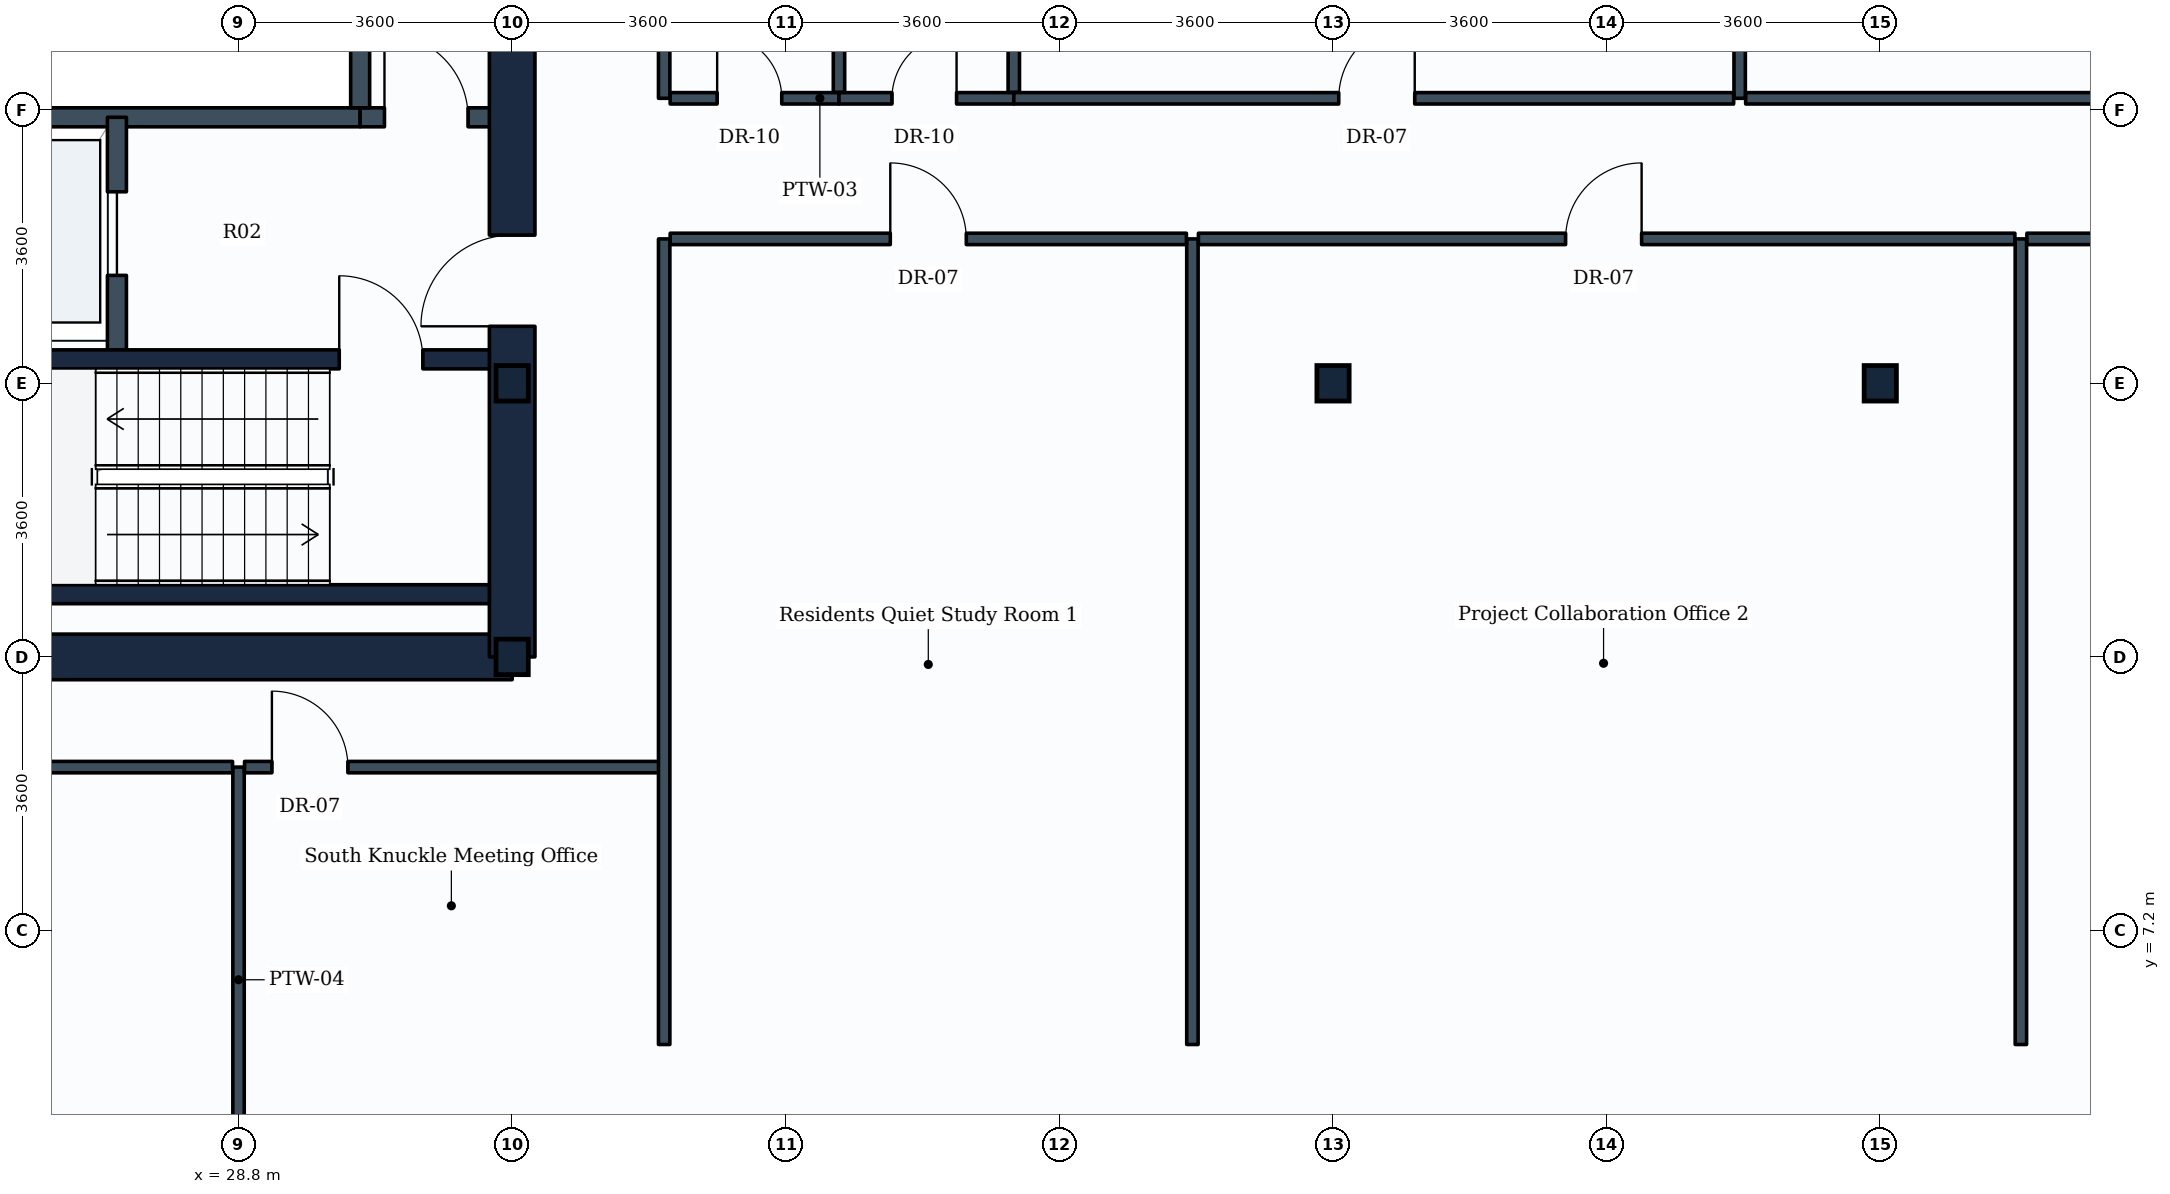
"""IFC4 building model, lengths in metres.
Left out: names, types, materials, properties, quantities, classifications, styles, units other than length and angle.
Written with IfcOpenShell. Run it as: python <this file> out.ifc"""

import sys

from ifc_helpers import new_model, si_unit, direction, frame, frame_2d, origin, origin_2d, place, context, subcontext, project, spatial, rectangle, i_section, extrude, element, fill, save


model = new_model("IFC4")
c1 = context("Model", 3, precision=1e-05, world=origin(), true_north=direction((0.0, 1.0)))
c2 = subcontext(c1, "Body", "Model", "MODEL_VIEW")
j1 = project(units=[si_unit("LENGTHUNIT", "METRE"), si_unit("PLANEANGLEUNIT", "RADIAN")], contexts=[c1])
p1 = place(None, origin())
s1 = spatial("IfcSite", under=j1, at=p1, CompositionType="ELEMENT")
p2 = place(p1, origin())
s2 = spatial("IfcBuilding", under=s1, at=p2, CompositionType="ELEMENT")
p3 = place(p2, frame((0.0, 0.0, 63.0)))
s3 = spatial("IfcBuildingStorey", under=s2, at=p3, CompositionType="ELEMENT", Elevation=63.0)
for number, where, z_axis, x_axis in (
    (1, (32.4, 10.8, 0.0), (0.0, 0.0, 1.0), (1.0, 0.0, 0.0)),
    (2, (32.4, 14.4, 0.0), (0.0, 0.0, 1.0), (1.0, 0.0, 0.0)),
    (3, (43.2, 14.4, 0.0), (0.0, 0.0, 1.0), (1.0, 0.0, 0.0)),
    (4, (50.4, 14.4, 0.0), (0.0, 0.0, 1.0), (1.0, 0.0, 0.0)),
):
    element("IfcColumn", number, at=place(p3, frame(where, z_axis=z_axis, x_axis=x_axis)), inside=s3, PredefinedType="COLUMN", context=c2, shape_type="SweptSolid", body=[
        extrude(i_section(OverallWidth=0.424, OverallDepth=0.467, WebThickness=0.033, FlangeThickness=0.053, FilletRadius=0.015, at=origin_2d()), origin(), (0.0, 0.0, 1.0), 3.9),
    ])
p4 = place(p3, frame((14.4, 10.8, 0.0), z_axis=(0.0, 0.0, 1.0), x_axis=(1.0, 0.0, 0.0)))
e5 = element("IfcWall", 5, at=p4, inside=s3, PredefinedType="SHEAR", context=c2, shape_type="SweptSolid", body=[
    extrude(rectangle(XDim=18.0, YDim=0.6, at=frame_2d((9.0, 0.0))), origin(), (0.0, 0.0, 1.0), 3.65),
])
p5 = place(p3, frame((32.4, 10.8, 0.0), z_axis=(0.0, 0.0, 1.0), x_axis=(0.0, 1.0, 0.0)))
e6 = element("IfcWall", 6, at=p5, inside=s3, PredefinedType="SHEAR", context=c2, shape_type="SweptSolid", body=[
    extrude(rectangle(XDim=14.4, YDim=0.6, at=frame_2d((7.2, 0.0))), origin(), (0.0, 0.0, 1.0), 3.65),
])
p6 = place(p5, frame((4.35, 0.0, 0.0)))
e7 = element("IfcOpeningElement", 7, at=p6, cuts=e6, PredefinedType="OPENING", context=c2, shape_type="SweptSolid", body=[
    extrude(rectangle(XDim=1.2, YDim=2.1, at=frame_2d((0.6, 1.05))), frame((0.0, 0.31, 0.0), z_axis=(0.0, -1.0, 0.0), x_axis=(1.0, 0.0, 0.0)), (0.0, 0.0, 1.0), 0.62),
])
p7 = place(p5, frame((10.0, 0.0, 0.0)))
e8 = element("IfcOpeningElement", 8, at=p7, cuts=e6, PredefinedType="OPENING", context=c2, shape_type="SweptSolid", body=[
    extrude(rectangle(XDim=1.2, YDim=2.1, at=frame_2d((0.6, 1.05))), frame((0.0, 0.31, 0.0), z_axis=(0.0, -1.0, 0.0), x_axis=(1.0, 0.0, 0.0)), (0.0, 0.0, 1.0), 0.62),
])
p8 = place(p3, frame((23.35, 11.625, 0.0), z_axis=(0.0, 0.0, 1.0), x_axis=(1.0, 0.0, 0.0)))
e9 = element("IfcWall", 9, at=p8, inside=s3, PredefinedType="SHEAR", context=c2, shape_type="SweptSolid", body=[
    extrude(rectangle(XDim=8.75, YDim=0.25, at=frame_2d((4.375, 0.0))), origin(), (0.0, 0.0, 1.0), 3.65),
])
p9 = place(p3, frame((23.35, 14.715, 0.0), z_axis=(0.0, 0.0, 1.0), x_axis=(1.0, 0.0, 0.0)))
e10 = element("IfcWall", 10, at=p9, inside=s3, PredefinedType="SHEAR", context=c2, shape_type="SweptSolid", body=[
    extrude(rectangle(XDim=8.75, YDim=0.25, at=frame_2d((4.375, 0.0))), origin(), (0.0, 0.0, 1.0), 3.65),
])
p10 = place(p9, frame((6.775, 0.0, 0.0)))
e11 = element("IfcOpeningElement", 11, at=p10, cuts=e10, PredefinedType="OPENING", context=c2, shape_type="SweptSolid", body=[
    extrude(rectangle(XDim=1.1, YDim=2.1, at=frame_2d((0.55, 1.05))), frame((0.0, 0.135, 0.0), z_axis=(0.0, -1.0, 0.0), x_axis=(1.0, 0.0, 0.0)), (0.0, 0.0, 1.0), 0.27),
])
p11 = place(p3, frame((21.88, 17.9, 0.0), z_axis=(0.0, 0.0, 1.0), x_axis=(1.0, 0.0, 0.0)))
e12 = element("IfcWall", 12, at=p11, inside=s3, PredefinedType="PARTITIONING", context=c2, shape_type="SweptSolid", body=[
    extrude(rectangle(XDim=8.52, YDim=0.25, at=frame_2d((4.26, 0.0))), origin(), (0.0, 0.0, 1.0), 3.635),
])
p12 = place(p3, frame((30.4, 17.9, 0.0), z_axis=(0.0, 0.0, 1.0), x_axis=(1.0, 0.0, 0.0)))
e13 = element("IfcWall", 13, at=p12, inside=s3, PredefinedType="PARTITIONING", context=c2, shape_type="SweptSolid", body=[
    extrude(rectangle(XDim=1.75, YDim=0.25, at=frame_2d((0.875, 0.0))), origin(), (0.0, 0.0, 1.0), 3.635),
])
p13 = place(p12, frame((0.32, 0.0, 0.0)))
e14 = element("IfcOpeningElement", 14, at=p13, cuts=e13, PredefinedType="OPENING", context=c2, shape_type="SweptSolid", body=[
    extrude(rectangle(XDim=1.1, YDim=2.1, at=frame_2d((0.55, 1.05))), frame((0.0, 0.135, 0.0), z_axis=(0.0, -1.0, 0.0), x_axis=(1.0, 0.0, 0.0)), (0.0, 0.0, 1.0), 0.27),
])
p14 = place(p3, frame((27.2, 14.84, 0.0), z_axis=(0.0, 0.0, 1.0), x_axis=(0.0, 1.0, 0.0)))
e15 = element("IfcWall", 15, at=p14, inside=s3, PredefinedType="PARTITIONING", context=c2, shape_type="SweptSolid", body=[
    extrude(rectangle(XDim=3.06, YDim=0.25, at=frame_2d((1.53, 0.0))), origin(), (0.0, 0.0, 1.0), 3.635),
])
p15 = place(p14, frame((0.98, 0.0, 0.0)))
e16 = element("IfcOpeningElement", 16, at=p15, cuts=e15, PredefinedType="OPENING", context=c2, shape_type="SweptSolid", body=[
    extrude(rectangle(XDim=1.1, YDim=2.1, at=frame_2d((0.55, 1.05))), frame((0.0, 0.135, 0.0), z_axis=(0.0, -1.0, 0.0), x_axis=(1.0, 0.0, 0.0)), (0.0, 0.0, 1.0), 0.27),
])
p16 = place(p3, frame((30.4, 18.025, 0.0), z_axis=(0.0, 0.0, 1.0), x_axis=(0.0, 1.0, 0.0)))
e17 = element("IfcWall", 17, at=p16, inside=s3, PredefinedType="PARTITIONING", context=c2, shape_type="SweptSolid", body=[
    extrude(rectangle(XDim=2.27, YDim=0.25, at=frame_2d((1.135, 0.0))), origin(), (0.0, 0.0, 1.0), 3.635),
])
p17 = place(p3, frame((34.4, 18.15, 0.0), z_axis=(0.0, 0.0, 1.0), x_axis=(0.0, 1.0, 0.0)))
e18 = element("IfcWall", 18, at=p17, inside=s3, PredefinedType="PARTITIONING", context=c2, shape_type="SweptSolid", body=[
    extrude(rectangle(XDim=6.896, YDim=0.15, at=frame_2d((3.448, 0.0))), origin(), (0.0, 0.0, 1.0), 2.93),
])
p18 = place(p3, frame((34.479, 18.15, 0.0), z_axis=(0.0, 0.0, 1.0), x_axis=(1.0, 0.0, 0.0)))
e19 = element("IfcWall", 19, at=p18, inside=s3, PredefinedType="PARTITIONING", context=c2, shape_type="SweptSolid", body=[
    extrude(rectangle(XDim=2.221, YDim=0.15, at=frame_2d((1.11, 0.0))), origin(), (0.0, 0.0, 1.0), 3.08),
])
p19 = place(p18, frame((0.618, 0.0, 0.0)))
e20 = element("IfcOpeningElement", 20, at=p19, cuts=e19, PredefinedType="OPENING", context=c2, shape_type="SweptSolid", body=[
    extrude(rectangle(XDim=0.85, YDim=2.1, at=frame_2d((0.425, 1.05))), frame((0.0, 0.085, 0.0), z_axis=(0.0, -1.0, 0.0), x_axis=(1.0, 0.0, 0.0)), (0.0, 0.0, 1.0), 0.17),
])
p20 = place(p3, frame((36.7, 18.229, 0.0), z_axis=(0.0, 0.0, 1.0), x_axis=(0.0, 1.0, 0.0)))
e21 = element("IfcWall", 21, at=p20, inside=s3, PredefinedType="PARTITIONING", context=c2, shape_type="SweptSolid", body=[
    extrude(rectangle(XDim=6.817, YDim=0.15, at=frame_2d((3.408, 0.0))), origin(), (0.0, 0.0, 1.0), 2.93),
])
p21 = place(p3, frame((36.7, 18.15, 0.0), z_axis=(0.0, 0.0, 1.0), x_axis=(1.0, 0.0, 0.0)))
e22 = element("IfcWall", 22, at=p21, inside=s3, PredefinedType="PARTITIONING", context=c2, shape_type="SweptSolid", body=[
    extrude(rectangle(XDim=2.3, YDim=0.15, at=frame_2d((1.15, 0.0))), origin(), (0.0, 0.0, 1.0), 3.08),
])
p22 = place(p21, frame((0.697, 0.0, 0.0)))
e23 = element("IfcOpeningElement", 23, at=p22, cuts=e22, PredefinedType="OPENING", context=c2, shape_type="SweptSolid", body=[
    extrude(rectangle(XDim=0.85, YDim=2.1, at=frame_2d((0.425, 1.05))), frame((0.0, 0.085, 0.0), z_axis=(0.0, -1.0, 0.0), x_axis=(1.0, 0.0, 0.0)), (0.0, 0.0, 1.0), 0.17),
])
p23 = place(p3, frame((39.0, 18.229, 0.0), z_axis=(0.0, 0.0, 1.0), x_axis=(0.0, 1.0, 0.0)))
e24 = element("IfcWall", 24, at=p23, inside=s3, PredefinedType="PARTITIONING", context=c2, shape_type="SweptSolid", body=[
    extrude(rectangle(XDim=3.821, YDim=0.15, at=frame_2d((1.911, 0.0))), origin(), (0.0, 0.0, 1.0), 3.03),
])
p24 = place(p3, frame((28.8, 9.35, 0.0), z_axis=(0.0, 0.0, 1.0), x_axis=(0.0, -1.0, 0.0)))
e25 = element("IfcWall", 25, at=p24, inside=s3, PredefinedType="PARTITIONING", context=c2, shape_type="SweptSolid", body=[
    extrude(rectangle(XDim=5.596, YDim=0.15, at=frame_2d((2.798, 0.0))), origin(), (0.0, 0.0, 1.0), 3.635),
])
p25 = place(p3, frame((13.08, 9.35, 0.0), z_axis=(0.0, 0.0, 1.0), x_axis=(1.0, 0.0, 0.0)))
e26 = element("IfcWall", 26, at=p25, inside=s3, PredefinedType="PARTITIONING", context=c2, shape_type="SweptSolid", body=[
    extrude(rectangle(XDim=15.641, YDim=0.15, at=frame_2d((7.82, 0.0))), origin(), (0.0, 0.0, 1.0), 3.04),
])
p26 = place(p3, frame((28.879, 9.35, 0.0), z_axis=(0.0, 0.0, 1.0), x_axis=(1.0, 0.0, 0.0)))
e27 = element("IfcWall", 27, at=p26, inside=s3, PredefinedType="PARTITIONING", context=c2, shape_type="SweptSolid", body=[
    extrude(rectangle(XDim=5.521, YDim=0.15, at=frame_2d((2.76, 0.0))), origin(), (0.0, 0.0, 1.0), 3.635),
])
p27 = place(p26, frame((0.36, 0.0, 0.0)))
e28 = element("IfcOpeningElement", 28, at=p27, cuts=e27, PredefinedType="OPENING", context=c2, shape_type="SweptSolid", body=[
    extrude(rectangle(XDim=1.0, YDim=2.1, at=frame_2d((0.5, 1.05))), frame((0.0, 0.085, 0.0), z_axis=(0.0, -1.0, 0.0), x_axis=(1.0, 0.0, 0.0)), (0.0, 0.0, 1.0), 0.17),
])
p28 = place(p3, frame((34.4, 5.7, 0.0), z_axis=(0.0, 0.0, 1.0), x_axis=(0.0, 1.0, 0.0)))
e29 = element("IfcWall", 29, at=p28, inside=s3, PredefinedType="PARTITIONING", context=c2, shape_type="SweptSolid", body=[
    extrude(rectangle(XDim=10.6, YDim=0.15, at=frame_2d((5.3, 0.0))), origin(), (0.0, 0.0, 1.0), 3.08),
])
p29 = place(p3, frame((41.35, 5.7, 0.0), z_axis=(0.0, 0.0, 1.0), x_axis=(0.0, 1.0, 0.0)))
e30 = element("IfcWall", 30, at=p29, inside=s3, PredefinedType="PARTITIONING", context=c2, shape_type="SweptSolid", body=[
    extrude(rectangle(XDim=10.6, YDim=0.15, at=frame_2d((5.3, 0.0))), origin(), (0.0, 0.0, 1.0), 3.03),
])
p30 = place(p3, frame((34.479, 16.3, 0.0), z_axis=(0.0, 0.0, 1.0), x_axis=(1.0, 0.0, 0.0)))
e31 = element("IfcWall", 31, at=p30, inside=s3, PredefinedType="PARTITIONING", context=c2, shape_type="SweptSolid", body=[
    extrude(rectangle(XDim=6.792, YDim=0.15, at=frame_2d((3.396, 0.0))), origin(), (0.0, 0.0, 1.0), 3.04),
])
p31 = place(p30, frame((2.896, 0.0, 0.0)))
e32 = element("IfcOpeningElement", 32, at=p31, cuts=e31, PredefinedType="OPENING", context=c2, shape_type="SweptSolid", body=[
    extrude(rectangle(XDim=1.0, YDim=2.1, at=frame_2d((0.5, 1.05))), frame((0.0, 0.085, 0.0), z_axis=(0.0, -1.0, 0.0), x_axis=(1.0, 0.0, 0.0)), (0.0, 0.0, 1.0), 0.17),
])
p32 = place(p3, frame((52.25, 5.7, 0.0), z_axis=(0.0, 0.0, 1.0), x_axis=(0.0, 1.0, 0.0)))
e33 = element("IfcWall", 33, at=p32, inside=s3, PredefinedType="PARTITIONING", context=c2, shape_type="SweptSolid", body=[
    extrude(rectangle(XDim=10.6, YDim=0.15, at=frame_2d((5.3, 0.0))), origin(), (0.0, 0.0, 1.0), 3.03),
])
p33 = place(p3, frame((41.429, 16.3, 0.0), z_axis=(0.0, 0.0, 1.0), x_axis=(1.0, 0.0, 0.0)))
e34 = element("IfcWall", 34, at=p33, inside=s3, PredefinedType="PARTITIONING", context=c2, shape_type="SweptSolid", body=[
    extrude(rectangle(XDim=10.742, YDim=0.15, at=frame_2d((5.371, 0.0))), origin(), (0.0, 0.0, 1.0), 3.04),
])
p34 = place(p33, frame((4.831, 0.0, 0.0)))
e35 = element("IfcOpeningElement", 35, at=p34, cuts=e34, PredefinedType="OPENING", context=c2, shape_type="SweptSolid", body=[
    extrude(rectangle(XDim=1.0, YDim=2.1, at=frame_2d((0.5, 1.05))), frame((0.0, 0.085, 0.0), z_axis=(0.0, -1.0, 0.0), x_axis=(1.0, 0.0, 0.0)), (0.0, 0.0, 1.0), 0.17),
])
p35 = place(p3, frame((52.329, 16.3, 0.0), z_axis=(0.0, 0.0, 1.0), x_axis=(1.0, 0.0, 0.0)))
e36 = element("IfcWall", 36, at=p35, inside=s3, PredefinedType="PARTITIONING", context=c2, shape_type="SweptSolid", body=[
    extrude(rectangle(XDim=8.717, YDim=0.15, at=frame_2d((4.358, 0.0))), origin(), (0.0, 0.0, 1.0), 2.93),
])
p36 = place(p35, frame((3.856, 0.0, 0.0)))
e37 = element("IfcOpeningElement", 37, at=p36, cuts=e36, PredefinedType="OPENING", context=c2, shape_type="SweptSolid", body=[
    extrude(rectangle(XDim=1.0, YDim=2.1, at=frame_2d((0.5, 1.05))), frame((0.0, 0.085, 0.0), z_axis=(0.0, -1.0, 0.0), x_axis=(1.0, 0.0, 0.0)), (0.0, 0.0, 1.0), 0.17),
])
p37 = place(p3, frame((48.55, 18.15, 0.0), z_axis=(0.0, 0.0, 1.0), x_axis=(0.0, 1.0, 0.0)))
e38 = element("IfcWall", 38, at=p37, inside=s3, PredefinedType="PARTITIONING", context=c2, shape_type="SweptSolid", body=[
    extrude(rectangle(XDim=6.896, YDim=0.15, at=frame_2d((3.448, 0.0))), origin(), (0.0, 0.0, 1.0), 2.93),
])
p38 = place(p3, frame((39.0, 18.15, 0.0), z_axis=(0.0, 0.0, 1.0), x_axis=(1.0, 0.0, 0.0)))
e39 = element("IfcWall", 39, at=p38, inside=s3, PredefinedType="PARTITIONING", context=c2, shape_type="SweptSolid", body=[
    extrude(rectangle(XDim=9.471, YDim=0.15, at=frame_2d((4.735, 0.0))), origin(), (0.0, 0.0, 1.0), 3.03),
])
p39 = place(p38, frame((4.275, 0.0, 0.0)))
e40 = element("IfcOpeningElement", 40, at=p39, cuts=e39, PredefinedType="OPENING", context=c2, shape_type="SweptSolid", body=[
    extrude(rectangle(XDim=1.0, YDim=2.1, at=frame_2d((0.5, 1.05))), frame((0.0, 0.085, 0.0), z_axis=(0.0, -1.0, 0.0), x_axis=(1.0, 0.0, 0.0)), (0.0, 0.0, 1.0), 0.17),
])
p40 = place(p3, frame((48.629, 18.15, 0.0), z_axis=(0.0, 0.0, 1.0), x_axis=(1.0, 0.0, 0.0)))
e41 = element("IfcWall", 41, at=p40, inside=s3, PredefinedType="PARTITIONING", context=c2, shape_type="SweptSolid", body=[
    extrude(rectangle(XDim=12.417, YDim=0.15, at=frame_2d((6.208, 0.0))), origin(), (0.0, 0.0, 1.0), 2.93),
])
p41 = place(p40, frame((5.706, 0.0, 0.0)))
e42 = element("IfcOpeningElement", 42, at=p41, cuts=e41, PredefinedType="OPENING", context=c2, shape_type="SweptSolid", body=[
    extrude(rectangle(XDim=1.0, YDim=2.1, at=frame_2d((0.5, 1.05))), frame((0.0, 0.085, 0.0), z_axis=(0.0, -1.0, 0.0), x_axis=(1.0, 0.0, 0.0)), (0.0, 0.0, 1.0), 0.17),
])
p42 = place(p10, origin())
e43 = element("IfcDoor", 43, at=p42, inside=s3, OperationType="SINGLE_SWING_LEFT", PredefinedType="DOOR", context=c2, shape_type="SweptSolid", body=[
    extrude(rectangle(XDim=1.1, YDim=2.1, at=frame_2d((0.55, 1.05))), frame((0.0, 0.025, 0.0), z_axis=(0.0, -1.0, 0.0), x_axis=(1.0, 0.0, 0.0)), (0.0, 0.0, 1.0), 0.05),
])
fill(e11, e43)
p43 = place(p15, origin())
e44 = element("IfcDoor", 44, at=p43, inside=s3, OperationType="SLIDING_TO_LEFT", PredefinedType="DOOR", context=c2, shape_type="SweptSolid", body=[
    extrude(rectangle(XDim=1.1, YDim=2.1, at=frame_2d((0.55, 1.05))), frame((0.0, 0.025, 0.0), z_axis=(0.0, -1.0, 0.0), x_axis=(1.0, 0.0, 0.0)), (0.0, 0.0, 1.0), 0.05),
])
fill(e16, e44)
p44 = place(p6, origin())
e45 = element("IfcDoor", 45, at=p44, inside=s3, OperationType="SINGLE_SWING_LEFT", PredefinedType="DOOR", context=c2, shape_type="SweptSolid", body=[
    extrude(rectangle(XDim=1.2, YDim=2.1, at=frame_2d((0.6, 1.05))), frame((0.0, 0.025, 0.0), z_axis=(0.0, -1.0, 0.0), x_axis=(1.0, 0.0, 0.0)), (0.0, 0.0, 1.0), 0.05),
])
fill(e7, e45)
p45 = place(p13, origin())
e46 = element("IfcDoor", 46, at=p45, inside=s3, OperationType="SINGLE_SWING_LEFT", PredefinedType="DOOR", context=c2, shape_type="SweptSolid", body=[
    extrude(rectangle(XDim=1.1, YDim=2.1, at=frame_2d((0.55, 1.05))), frame((0.0, 0.025, 0.0), z_axis=(0.0, -1.0, 0.0), x_axis=(1.0, 0.0, 0.0)), (0.0, 0.0, 1.0), 0.05),
])
fill(e14, e46)
p46 = place(p19, origin())
e47 = element("IfcDoor", 47, at=p46, inside=s3, OperationType="SINGLE_SWING_LEFT", PredefinedType="DOOR", context=c2, shape_type="SweptSolid", body=[
    extrude(rectangle(XDim=0.85, YDim=2.1, at=frame_2d((0.425, 1.05))), frame((0.0, 0.025, 0.0), z_axis=(0.0, -1.0, 0.0), x_axis=(1.0, 0.0, 0.0)), (0.0, 0.0, 1.0), 0.05),
])
fill(e20, e47)
p47 = place(p22, origin())
e48 = element("IfcDoor", 48, at=p47, inside=s3, OperationType="SINGLE_SWING_RIGHT", PredefinedType="DOOR", context=c2, shape_type="SweptSolid", body=[
    extrude(rectangle(XDim=0.85, YDim=2.1, at=frame_2d((0.425, 1.05))), frame((0.0, 0.025, 0.0), z_axis=(0.0, -1.0, 0.0), x_axis=(1.0, 0.0, 0.0)), (0.0, 0.0, 1.0), 0.05),
])
fill(e23, e48)
p48 = place(p27, origin())
e49 = element("IfcDoor", 49, at=p48, inside=s3, OperationType="SINGLE_SWING_LEFT", PredefinedType="DOOR", context=c2, shape_type="SweptSolid", body=[
    extrude(rectangle(XDim=1.0, YDim=2.1, at=frame_2d((0.5, 1.05))), frame((0.0, 0.025, 0.0), z_axis=(0.0, -1.0, 0.0), x_axis=(1.0, 0.0, 0.0)), (0.0, 0.0, 1.0), 0.05),
])
fill(e28, e49)
p49 = place(p31, origin())
e50 = element("IfcDoor", 50, at=p49, inside=s3, OperationType="SINGLE_SWING_LEFT", PredefinedType="DOOR", context=c2, shape_type="SweptSolid", body=[
    extrude(rectangle(XDim=1.0, YDim=2.1, at=frame_2d((0.5, 1.05))), frame((0.0, 0.025, 0.0), z_axis=(0.0, -1.0, 0.0), x_axis=(1.0, 0.0, 0.0)), (0.0, 0.0, 1.0), 0.05),
])
fill(e32, e50)
p50 = place(p34, origin())
e51 = element("IfcDoor", 51, at=p50, inside=s3, OperationType="SINGLE_SWING_RIGHT", PredefinedType="DOOR", context=c2, shape_type="SweptSolid", body=[
    extrude(rectangle(XDim=1.0, YDim=2.1, at=frame_2d((0.5, 1.05))), frame((0.0, 0.025, 0.0), z_axis=(0.0, -1.0, 0.0), x_axis=(1.0, 0.0, 0.0)), (0.0, 0.0, 1.0), 0.05),
])
fill(e35, e51)
p51 = place(p39, origin())
e52 = element("IfcDoor", 52, at=p51, inside=s3, OperationType="SINGLE_SWING_RIGHT", PredefinedType="DOOR", context=c2, shape_type="SweptSolid", body=[
    extrude(rectangle(XDim=1.0, YDim=2.1, at=frame_2d((0.5, 1.05))), frame((0.0, 0.025, 0.0), z_axis=(0.0, -1.0, 0.0), x_axis=(1.0, 0.0, 0.0)), (0.0, 0.0, 1.0), 0.05),
])
fill(e40, e52)
save(model, sys.argv[1])
